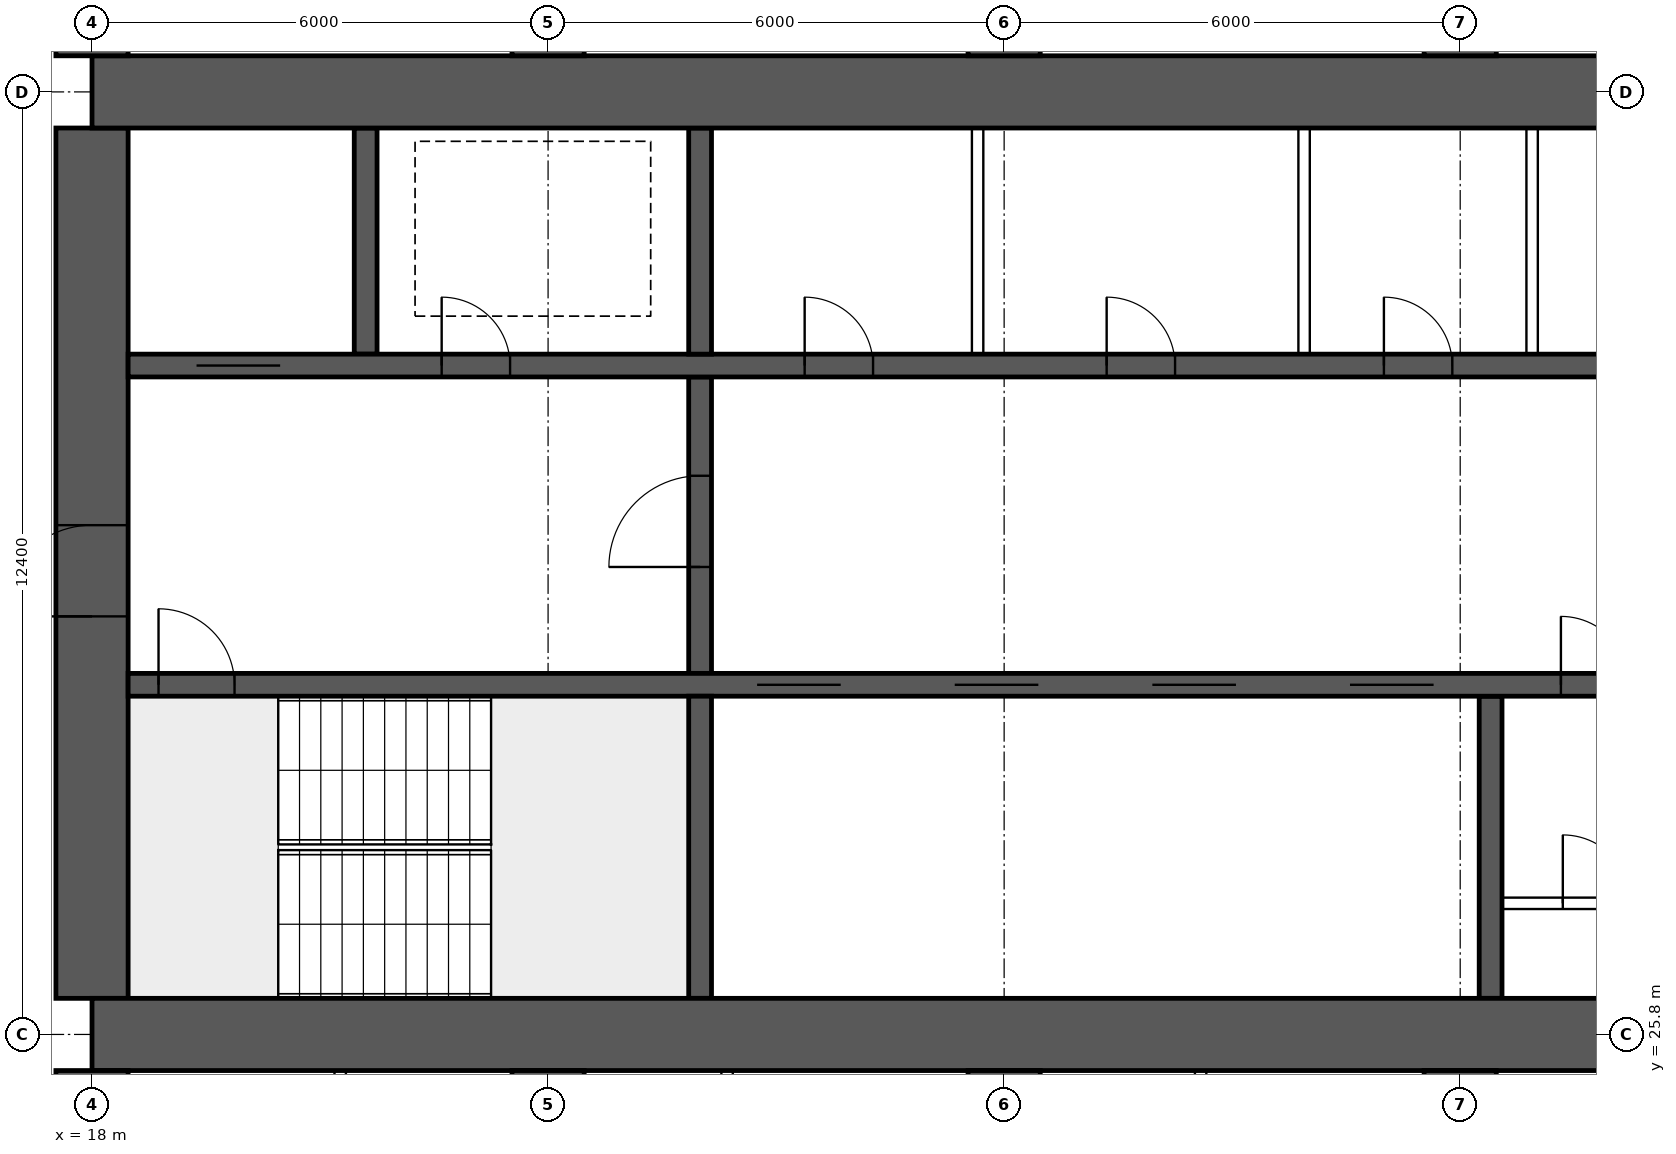
"""IFC4 building model, lengths in metres.
Left out: names, types, materials, properties, quantities, classifications, styles, units other than length and angle.
Written with IfcOpenShell. Run it as: python <this file> out.ifc"""

import sys

from ifc_helpers import new_model, si_unit, direction, frame, frame_2d, origin, place, context, subcontext, project, spatial, rectangle, extrude, element, fill, save


model = new_model("IFC4")
c1 = context("Model", 3, precision=1e-05, world=origin(), true_north=direction((0.0, 1.0)))
c2 = subcontext(c1, "Body", "Model", "MODEL_VIEW")
j1 = project(units=[si_unit("LENGTHUNIT", "METRE"), si_unit("PLANEANGLEUNIT", "RADIAN")], contexts=[c1])
p1 = place(None, origin())
s1 = spatial("IfcSite", under=j1, at=p1, CompositionType="ELEMENT")
p2 = place(p1, origin())
s2 = spatial("IfcBuilding", under=s1, at=p2, CompositionType="ELEMENT")
p3 = place(p2, frame((0.0, 0.0, 84.4)))
s3 = spatial("IfcBuildingStorey", under=s2, at=p3, CompositionType="ELEMENT", Elevation=84.4)
for number, where, z_axis, x_axis in (
    (1, (18.0, 25.8, 0.0), (0.0, 0.0, 1.0), (1.0, 0.0, 0.0)),
    (2, (18.0, 38.2, 0.0), (0.0, 0.0, 1.0), (1.0, 0.0, 0.0)),
):
    element("IfcWall", number, at=place(p3, frame(where, z_axis=z_axis, x_axis=x_axis)), inside=s3, PredefinedType="SHEAR", context=c2, shape_type="SweptSolid", body=[
        extrude(rectangle(XDim=48.0, YDim=0.95, at=frame_2d((24.0, 0.0))), origin(), (0.0, 0.0, 1.0), 3.75),
    ])
p4 = place(p3, frame((18.0, 26.275, 0.0), z_axis=(0.0, 0.0, 1.0), x_axis=(0.0, 1.0, 0.0)))
e3 = element("IfcWall", 3, at=p4, inside=s3, PredefinedType="SHEAR", context=c2, shape_type="SweptSolid", body=[
    extrude(rectangle(XDim=11.45, YDim=0.95, at=frame_2d((5.725, 0.0))), origin(), (0.0, 0.0, 1.0), 3.75),
])
p5 = place(p4, frame((5.025, 0.0, 0.0)))
e4 = element("IfcOpeningElement", 4, at=p5, cuts=e3, PredefinedType="OPENING", context=c2, shape_type="SweptSolid", body=[
    extrude(rectangle(XDim=1.2, YDim=2.1, at=frame_2d((0.6, 1.05))), frame((0.0, 0.485, 0.0), z_axis=(0.0, -1.0, 0.0), x_axis=(1.0, 0.0, 0.0)), (0.0, 0.0, 1.0), 0.97),
])
p6 = place(p3, frame((18.475, 30.4, 0.0), z_axis=(0.0, 0.0, 1.0), x_axis=(1.0, 0.0, 0.0)))
e5 = element("IfcWall", 5, at=p6, inside=s3, PredefinedType="SHEAR", context=c2, shape_type="SweptSolid", body=[
    extrude(rectangle(XDim=47.05, YDim=0.3, at=frame_2d((23.525, 0.0))), origin(), (0.0, 0.0, 1.0), 3.75),
])
p7 = place(p6, frame((0.4, 0.0, 0.0)))
e6 = element("IfcOpeningElement", 6, at=p7, cuts=e5, PredefinedType="OPENING", context=c2, shape_type="SweptSolid", body=[
    extrude(rectangle(XDim=1.0, YDim=2.1, at=frame_2d((0.5, 1.05))), frame((0.0, 0.16, 0.0), z_axis=(0.0, -1.0, 0.0), x_axis=(1.0, 0.0, 0.0)), (0.0, 0.0, 1.0), 0.32),
])
p8 = place(p6, frame((45.65, 0.0, 0.0)))
e7 = element("IfcOpeningElement", 7, at=p8, cuts=e5, PredefinedType="OPENING", context=c2, shape_type="SweptSolid", body=[
    extrude(rectangle(XDim=1.0, YDim=2.1, at=frame_2d((0.5, 1.05))), frame((0.0, 0.16, 0.0), z_axis=(0.0, -1.0, 0.0), x_axis=(1.0, 0.0, 0.0)), (0.0, 0.0, 1.0), 0.32),
])
p9 = place(p6, frame((8.275, 0.0, 0.0)))
e8 = element("IfcOpeningElement", 8, at=p9, cuts=e5, PredefinedType="OPENING", context=c2, shape_type="SweptSolid", body=[
    extrude(rectangle(XDim=1.1, YDim=2.1, at=frame_2d((0.55, 1.05))), frame((0.0, 0.16, 0.0), z_axis=(0.0, -1.0, 0.0), x_axis=(1.0, 0.0, 0.0)), (0.0, 0.0, 1.0), 0.32),
])
p10 = place(p6, frame((10.875, 0.0, 0.0)))
e9 = element("IfcOpeningElement", 9, at=p10, cuts=e5, PredefinedType="OPENING", context=c2, shape_type="SweptSolid", body=[
    extrude(rectangle(XDim=1.1, YDim=2.1, at=frame_2d((0.55, 1.05))), frame((0.0, 0.16, 0.0), z_axis=(0.0, -1.0, 0.0), x_axis=(1.0, 0.0, 0.0)), (0.0, 0.0, 1.0), 0.32),
])
p11 = place(p6, frame((13.475, 0.0, 0.0)))
e10 = element("IfcOpeningElement", 10, at=p11, cuts=e5, PredefinedType="OPENING", context=c2, shape_type="SweptSolid", body=[
    extrude(rectangle(XDim=1.1, YDim=2.1, at=frame_2d((0.55, 1.05))), frame((0.0, 0.16, 0.0), z_axis=(0.0, -1.0, 0.0), x_axis=(1.0, 0.0, 0.0)), (0.0, 0.0, 1.0), 0.32),
])
p12 = place(p6, frame((16.075, 0.0, 0.0)))
e11 = element("IfcOpeningElement", 11, at=p12, cuts=e5, PredefinedType="OPENING", context=c2, shape_type="SweptSolid", body=[
    extrude(rectangle(XDim=1.1, YDim=2.1, at=frame_2d((0.55, 1.05))), frame((0.0, 0.16, 0.0), z_axis=(0.0, -1.0, 0.0), x_axis=(1.0, 0.0, 0.0)), (0.0, 0.0, 1.0), 0.32),
])
p13 = place(p6, frame((18.85, 0.0, 0.0)))
e12 = element("IfcOpeningElement", 12, at=p13, cuts=e5, PredefinedType="OPENING", context=c2, shape_type="SweptSolid", body=[
    extrude(rectangle(XDim=0.9, YDim=2.1, at=frame_2d((0.45, 1.05))), frame((0.0, 0.16, 0.0), z_axis=(0.0, -1.0, 0.0), x_axis=(1.0, 0.0, 0.0)), (0.0, 0.0, 1.0), 0.32),
])
p14 = place(p6, frame((30.142, 0.0, 0.0)))
e13 = element("IfcOpeningElement", 13, at=p14, cuts=e5, PredefinedType="OPENING", context=c2, shape_type="SweptSolid", body=[
    extrude(rectangle(XDim=1.1, YDim=2.1, at=frame_2d((0.55, 1.05))), frame((0.0, 0.16, 0.0), z_axis=(0.0, -1.0, 0.0), x_axis=(1.0, 0.0, 0.0)), (0.0, 0.0, 1.0), 0.32),
])
p15 = place(p6, frame((33.675, 0.0, 0.0)))
e14 = element("IfcOpeningElement", 14, at=p15, cuts=e5, PredefinedType="OPENING", context=c2, shape_type="SweptSolid", body=[
    extrude(rectangle(XDim=1.1, YDim=2.1, at=frame_2d((0.55, 1.05))), frame((0.0, 0.16, 0.0), z_axis=(0.0, -1.0, 0.0), x_axis=(1.0, 0.0, 0.0)), (0.0, 0.0, 1.0), 0.32),
])
p16 = place(p6, frame((37.208, 0.0, 0.0)))
e15 = element("IfcOpeningElement", 15, at=p16, cuts=e5, PredefinedType="OPENING", context=c2, shape_type="SweptSolid", body=[
    extrude(rectangle(XDim=1.1, YDim=2.1, at=frame_2d((0.55, 1.05))), frame((0.0, 0.16, 0.0), z_axis=(0.0, -1.0, 0.0), x_axis=(1.0, 0.0, 0.0)), (0.0, 0.0, 1.0), 0.32),
])
p17 = place(p3, frame((18.475, 34.6, 0.0), z_axis=(0.0, 0.0, 1.0), x_axis=(1.0, 0.0, 0.0)))
e16 = element("IfcWall", 16, at=p17, inside=s3, PredefinedType="SHEAR", context=c2, shape_type="SweptSolid", body=[
    extrude(rectangle(XDim=47.05, YDim=0.3, at=frame_2d((23.525, 0.0))), origin(), (0.0, 0.0, 1.0), 3.75),
])
p18 = place(p17, frame((0.9, 0.0, 0.0)))
e17 = element("IfcOpeningElement", 17, at=p18, cuts=e16, PredefinedType="OPENING", context=c2, shape_type="SweptSolid", body=[
    extrude(rectangle(XDim=1.1, YDim=2.1, at=frame_2d((0.55, 1.05))), frame((0.0, 0.16, 0.0), z_axis=(0.0, -1.0, 0.0), x_axis=(1.0, 0.0, 0.0)), (0.0, 0.0, 1.0), 0.32),
])
p19 = place(p17, frame((45.05, 0.0, 0.0)))
e18 = element("IfcOpeningElement", 18, at=p19, cuts=e16, PredefinedType="OPENING", context=c2, shape_type="SweptSolid", body=[
    extrude(rectangle(XDim=1.1, YDim=2.1, at=frame_2d((0.55, 1.05))), frame((0.0, 0.16, 0.0), z_axis=(0.0, -1.0, 0.0), x_axis=(1.0, 0.0, 0.0)), (0.0, 0.0, 1.0), 0.32),
])
p20 = place(p17, frame((4.125, 0.0, 0.0)))
e19 = element("IfcOpeningElement", 19, at=p20, cuts=e16, PredefinedType="OPENING", context=c2, shape_type="SweptSolid", body=[
    extrude(rectangle(XDim=0.9, YDim=2.1, at=frame_2d((0.45, 1.05))), frame((0.0, 0.16, 0.0), z_axis=(0.0, -1.0, 0.0), x_axis=(1.0, 0.0, 0.0)), (0.0, 0.0, 1.0), 0.32),
])
p21 = place(p17, frame((42.025, 0.0, 0.0)))
e20 = element("IfcOpeningElement", 20, at=p21, cuts=e16, PredefinedType="OPENING", context=c2, shape_type="SweptSolid", body=[
    extrude(rectangle(XDim=0.9, YDim=2.1, at=frame_2d((0.45, 1.05))), frame((0.0, 0.16, 0.0), z_axis=(0.0, -1.0, 0.0), x_axis=(1.0, 0.0, 0.0)), (0.0, 0.0, 1.0), 0.32),
])
p22 = place(p17, frame((8.9, 0.0, 0.0)))
e21 = element("IfcOpeningElement", 21, at=p22, cuts=e16, PredefinedType="OPENING", context=c2, shape_type="SweptSolid", body=[
    extrude(rectangle(XDim=0.9, YDim=2.1, at=frame_2d((0.45, 1.05))), frame((0.0, 0.16, 0.0), z_axis=(0.0, -1.0, 0.0), x_axis=(1.0, 0.0, 0.0)), (0.0, 0.0, 1.0), 0.32),
])
p23 = place(p17, frame((12.874, 0.0, 0.0)))
e22 = element("IfcOpeningElement", 22, at=p23, cuts=e16, PredefinedType="OPENING", context=c2, shape_type="SweptSolid", body=[
    extrude(rectangle(XDim=0.9, YDim=2.1, at=frame_2d((0.45, 1.05))), frame((0.0, 0.16, 0.0), z_axis=(0.0, -1.0, 0.0), x_axis=(1.0, 0.0, 0.0)), (0.0, 0.0, 1.0), 0.32),
])
p24 = place(p17, frame((16.521, 0.0, 0.0)))
e23 = element("IfcOpeningElement", 23, at=p24, cuts=e16, PredefinedType="OPENING", context=c2, shape_type="SweptSolid", body=[
    extrude(rectangle(XDim=0.9, YDim=2.1, at=frame_2d((0.45, 1.05))), frame((0.0, 0.16, 0.0), z_axis=(0.0, -1.0, 0.0), x_axis=(1.0, 0.0, 0.0)), (0.0, 0.0, 1.0), 0.32),
])
p25 = place(p17, frame((20.28, 0.0, 0.0)))
e24 = element("IfcOpeningElement", 24, at=p25, cuts=e16, PredefinedType="OPENING", context=c2, shape_type="SweptSolid", body=[
    extrude(rectangle(XDim=0.9, YDim=2.1, at=frame_2d((0.45, 1.05))), frame((0.0, 0.16, 0.0), z_axis=(0.0, -1.0, 0.0), x_axis=(1.0, 0.0, 0.0)), (0.0, 0.0, 1.0), 0.32),
])
p26 = place(p17, frame((24.686, 0.0, 0.0)))
e25 = element("IfcOpeningElement", 25, at=p26, cuts=e16, PredefinedType="OPENING", context=c2, shape_type="SweptSolid", body=[
    extrude(rectangle(XDim=0.9, YDim=2.1, at=frame_2d((0.45, 1.05))), frame((0.0, 0.16, 0.0), z_axis=(0.0, -1.0, 0.0), x_axis=(1.0, 0.0, 0.0)), (0.0, 0.0, 1.0), 0.32),
])
p27 = place(p17, frame((27.483, 0.0, 0.0)))
e26 = element("IfcOpeningElement", 26, at=p27, cuts=e16, PredefinedType="OPENING", context=c2, shape_type="SweptSolid", body=[
    extrude(rectangle(XDim=0.9, YDim=2.1, at=frame_2d((0.45, 1.05))), frame((0.0, 0.16, 0.0), z_axis=(0.0, -1.0, 0.0), x_axis=(1.0, 0.0, 0.0)), (0.0, 0.0, 1.0), 0.32),
])
p28 = place(p17, frame((33.604, 0.0, 0.0)))
e27 = element("IfcOpeningElement", 27, at=p28, cuts=e16, PredefinedType="OPENING", context=c2, shape_type="SweptSolid", body=[
    extrude(rectangle(XDim=0.9, YDim=2.1, at=frame_2d((0.45, 1.05))), frame((0.0, 0.16, 0.0), z_axis=(0.0, -1.0, 0.0), x_axis=(1.0, 0.0, 0.0)), (0.0, 0.0, 1.0), 0.32),
])
p29 = place(p3, frame((26.0, 26.275, 0.0), z_axis=(0.0, 0.0, 1.0), x_axis=(0.0, 1.0, 0.0)))
e28 = element("IfcWall", 28, at=p29, inside=s3, PredefinedType="SHEAR", context=c2, shape_type="SweptSolid", body=[
    extrude(rectangle(XDim=3.975, YDim=0.3, at=frame_2d((1.988, 0.0))), origin(), (0.0, 0.0, 1.0), 3.75),
])
p30 = place(p3, frame((26.0, 30.55, 0.0), z_axis=(0.0, 0.0, 1.0), x_axis=(0.0, 1.0, 0.0)))
e29 = element("IfcWall", 29, at=p30, inside=s3, PredefinedType="SHEAR", context=c2, shape_type="SweptSolid", body=[
    extrude(rectangle(XDim=3.9, YDim=0.3, at=frame_2d((1.95, 0.0))), origin(), (0.0, 0.0, 1.0), 3.75),
])
p31 = place(p30, frame((1.4, 0.0, 0.0)))
e30 = element("IfcOpeningElement", 30, at=p31, cuts=e29, PredefinedType="OPENING", context=c2, shape_type="SweptSolid", body=[
    extrude(rectangle(XDim=1.2, YDim=2.1, at=frame_2d((0.6, 1.05))), frame((0.0, 0.16, 0.0), z_axis=(0.0, -1.0, 0.0), x_axis=(1.0, 0.0, 0.0)), (0.0, 0.0, 1.0), 0.32),
])
for number, where, z_axis, x_axis in (
    (31, (21.6, 34.75, 0.0), (0.0, 0.0, 1.0), (0.0, 1.0, 0.0)),
    (32, (26.0, 34.75, 0.0), (0.0, 0.0, 1.0), (0.0, 1.0, 0.0)),
):
    element("IfcWall", number, at=place(p3, frame(where, z_axis=z_axis, x_axis=x_axis)), inside=s3, PredefinedType="SHEAR", context=c2, shape_type="SweptSolid", body=[
        extrude(rectangle(XDim=2.975, YDim=0.3, at=frame_2d((1.488, 0.0))), origin(), (0.0, 0.0, 1.0), 3.75),
    ])
p32 = place(p3, frame((36.4, 26.275, 0.0), z_axis=(0.0, 0.0, 1.0), x_axis=(0.0, 1.0, 0.0)))
e33 = element("IfcWall", 33, at=p32, inside=s3, PredefinedType="SHEAR", context=c2, shape_type="SweptSolid", body=[
    extrude(rectangle(XDim=3.975, YDim=0.3, at=frame_2d((1.988, 0.0))), origin(), (0.0, 0.0, 1.0), 3.75),
])
for number, where, z_axis, x_axis in (
    (34, (18.0, 16.0, 0.0), (0.0, 0.0, 1.0), (0.0, 1.0, 0.0)),
    (35, (18.0, 38.675, 0.0), (0.0, 0.0, 1.0), (0.0, 1.0, 0.0)),
    (36, (24.0, 16.0, 0.0), (0.0, 0.0, 1.0), (0.0, 1.0, 0.0)),
    (37, (24.0, 38.675, 0.0), (0.0, 0.0, 1.0), (0.0, 1.0, 0.0)),
    (38, (30.0, 16.0, 0.0), (0.0, 0.0, 1.0), (0.0, 1.0, 0.0)),
    (39, (30.0, 38.675, 0.0), (0.0, 0.0, 1.0), (0.0, 1.0, 0.0)),
    (40, (36.0, 16.0, 0.0), (0.0, 0.0, 1.0), (0.0, 1.0, 0.0)),
    (41, (36.0, 38.675, 0.0), (0.0, 0.0, 1.0), (0.0, 1.0, 0.0)),
):
    element("IfcWall", number, at=place(p3, frame(where, z_axis=z_axis, x_axis=x_axis)), inside=s3, PredefinedType="SHEAR", context=c2, shape_type="SweptSolid", body=[
        extrude(rectangle(XDim=9.325, YDim=0.95, at=frame_2d((4.663, 0.0))), origin(), (0.0, 0.0, 1.0), 3.75),
    ])
for number, where, z_axis, x_axis in (
    (42, (29.651, 34.75, 0.0), (0.0, 0.0, 1.0), (0.0, 1.0, 0.0)),
    (43, (33.946, 34.75, 0.0), (0.0, 0.0, 1.0), (0.0, 1.0, 0.0)),
    (44, (36.946, 34.75, 0.0), (0.0, 0.0, 1.0), (0.0, 1.0, 0.0)),
):
    element("IfcWall", number, at=place(p3, frame(where, z_axis=z_axis, x_axis=x_axis)), inside=s3, PredefinedType="SOLIDWALL", context=c2, shape_type="SweptSolid", body=[
        extrude(rectangle(XDim=2.975, YDim=0.15, at=frame_2d((1.488, 0.0))), origin(), (0.0, 0.0, 1.0), 3.5),
    ])
p33 = place(p3, frame((36.55, 27.525, 0.0), z_axis=(0.0, 0.0, 1.0), x_axis=(1.0, 0.0, 0.0)))
e45 = element("IfcWall", 45, at=p33, inside=s3, PredefinedType="SOLIDWALL", context=c2, shape_type="SweptSolid", body=[
    extrude(rectangle(XDim=2.5, YDim=0.15, at=frame_2d((1.25, 0.0))), origin(), (0.0, 0.0, 1.0), 3.5),
])
p34 = place(p33, frame((0.8, 0.0, 0.0)))
e46 = element("IfcOpeningElement", 46, at=p34, cuts=e45, PredefinedType="OPENING", context=c2, shape_type="SweptSolid", body=[
    extrude(rectangle(XDim=0.9, YDim=2.1, at=frame_2d((0.45, 1.05))), frame((0.0, 0.085, 0.0), z_axis=(0.0, -1.0, 0.0), x_axis=(1.0, 0.0, 0.0)), (0.0, 0.0, 1.0), 0.17),
])
for number, where, z_axis, x_axis in (
    (47, (21.265, 16.1, 0.0), (0.0, 0.0, 1.0), (0.0, 1.0, 0.0)),
    (48, (26.355, 16.1, 0.0), (0.0, 0.0, 1.0), (0.0, 1.0, 0.0)),
    (49, (32.585, 16.1, 0.0), (0.0, 0.0, 1.0), (0.0, 1.0, 0.0)),
):
    element("IfcWall", number, at=place(p3, frame(where, z_axis=z_axis, x_axis=x_axis)), inside=s3, PredefinedType="PARTITIONING", context=c2, shape_type="SweptSolid", body=[
        extrude(rectangle(XDim=9.225, YDim=0.15, at=frame_2d((4.612, 0.0))), origin(), (0.0, 0.0, 1.0), 3.5),
    ])
p35 = place(p5, origin())
e50 = element("IfcDoor", 50, at=p35, inside=s3, OperationType="SINGLE_SWING_LEFT", PredefinedType="DOOR", context=c2, shape_type="SweptSolid", body=[
    extrude(rectangle(XDim=1.2, YDim=2.1, at=frame_2d((0.6, 1.05))), frame((0.0, 0.025, 0.0), z_axis=(0.0, -1.0, 0.0), x_axis=(1.0, 0.0, 0.0)), (0.0, 0.0, 1.0), 0.05),
])
fill(e4, e50)
p36 = place(p7, origin())
e51 = element("IfcDoor", 51, at=p36, inside=s3, OperationType="SINGLE_SWING_LEFT", PredefinedType="DOOR", context=c2, shape_type="SweptSolid", body=[
    extrude(rectangle(XDim=1.0, YDim=2.1, at=frame_2d((0.5, 1.05))), frame((0.0, 0.025, 0.0), z_axis=(0.0, -1.0, 0.0), x_axis=(1.0, 0.0, 0.0)), (0.0, 0.0, 1.0), 0.05),
])
fill(e6, e51)
p37 = place(p18, origin())
e52 = element("IfcDoor", 52, at=p37, inside=s3, OperationType="DOUBLE_DOOR_SLIDING", PredefinedType="DOOR", context=c2, shape_type="SweptSolid", body=[
    extrude(rectangle(XDim=1.1, YDim=2.1, at=frame_2d((0.55, 1.05))), frame((0.0, 0.025, 0.0), z_axis=(0.0, -1.0, 0.0), x_axis=(1.0, 0.0, 0.0)), (0.0, 0.0, 1.0), 0.05),
])
fill(e17, e52)
p38 = place(p20, origin())
e53 = element("IfcDoor", 53, at=p38, inside=s3, OperationType="SINGLE_SWING_LEFT", PredefinedType="DOOR", context=c2, shape_type="SweptSolid", body=[
    extrude(rectangle(XDim=0.9, YDim=2.1, at=frame_2d((0.45, 1.05))), frame((0.0, 0.025, 0.0), z_axis=(0.0, -1.0, 0.0), x_axis=(1.0, 0.0, 0.0)), (0.0, 0.0, 1.0), 0.05),
])
fill(e19, e53)
p39 = place(p31, origin())
e54 = element("IfcDoor", 54, at=p39, inside=s3, OperationType="SINGLE_SWING_LEFT", PredefinedType="DOOR", context=c2, shape_type="SweptSolid", body=[
    extrude(rectangle(XDim=1.2, YDim=2.1, at=frame_2d((0.6, 1.05))), frame((0.0, 0.025, 0.0), z_axis=(0.0, -1.0, 0.0), x_axis=(1.0, 0.0, 0.0)), (0.0, 0.0, 1.0), 0.05),
])
fill(e30, e54)
p40 = place(p22, origin())
e55 = element("IfcDoor", 55, at=p40, inside=s3, OperationType="SINGLE_SWING_LEFT", PredefinedType="DOOR", context=c2, shape_type="SweptSolid", body=[
    extrude(rectangle(XDim=0.9, YDim=2.1, at=frame_2d((0.45, 1.05))), frame((0.0, 0.025, 0.0), z_axis=(0.0, -1.0, 0.0), x_axis=(1.0, 0.0, 0.0)), (0.0, 0.0, 1.0), 0.05),
])
fill(e21, e55)
p41 = place(p23, origin())
e56 = element("IfcDoor", 56, at=p41, inside=s3, OperationType="SINGLE_SWING_LEFT", PredefinedType="DOOR", context=c2, shape_type="SweptSolid", body=[
    extrude(rectangle(XDim=0.9, YDim=2.1, at=frame_2d((0.45, 1.05))), frame((0.0, 0.025, 0.0), z_axis=(0.0, -1.0, 0.0), x_axis=(1.0, 0.0, 0.0)), (0.0, 0.0, 1.0), 0.05),
])
fill(e22, e56)
p42 = place(p24, origin())
e57 = element("IfcDoor", 57, at=p42, inside=s3, OperationType="SINGLE_SWING_LEFT", PredefinedType="DOOR", context=c2, shape_type="SweptSolid", body=[
    extrude(rectangle(XDim=0.9, YDim=2.1, at=frame_2d((0.45, 1.05))), frame((0.0, 0.025, 0.0), z_axis=(0.0, -1.0, 0.0), x_axis=(1.0, 0.0, 0.0)), (0.0, 0.0, 1.0), 0.05),
])
fill(e23, e57)
p43 = place(p9, origin())
e58 = element("IfcDoor", 58, at=p43, inside=s3, OperationType="DOUBLE_DOOR_SLIDING", PredefinedType="DOOR", context=c2, shape_type="SweptSolid", body=[
    extrude(rectangle(XDim=1.1, YDim=2.1, at=frame_2d((0.55, 1.05))), frame((0.0, 0.025, 0.0), z_axis=(0.0, -1.0, 0.0), x_axis=(1.0, 0.0, 0.0)), (0.0, 0.0, 1.0), 0.05),
])
fill(e8, e58)
p44 = place(p10, origin())
e59 = element("IfcDoor", 59, at=p44, inside=s3, OperationType="DOUBLE_DOOR_SLIDING", PredefinedType="DOOR", context=c2, shape_type="SweptSolid", body=[
    extrude(rectangle(XDim=1.1, YDim=2.1, at=frame_2d((0.55, 1.05))), frame((0.0, 0.025, 0.0), z_axis=(0.0, -1.0, 0.0), x_axis=(1.0, 0.0, 0.0)), (0.0, 0.0, 1.0), 0.05),
])
fill(e9, e59)
p45 = place(p11, origin())
e60 = element("IfcDoor", 60, at=p45, inside=s3, OperationType="DOUBLE_DOOR_SLIDING", PredefinedType="DOOR", context=c2, shape_type="SweptSolid", body=[
    extrude(rectangle(XDim=1.1, YDim=2.1, at=frame_2d((0.55, 1.05))), frame((0.0, 0.025, 0.0), z_axis=(0.0, -1.0, 0.0), x_axis=(1.0, 0.0, 0.0)), (0.0, 0.0, 1.0), 0.05),
])
fill(e10, e60)
p46 = place(p12, origin())
e61 = element("IfcDoor", 61, at=p46, inside=s3, OperationType="DOUBLE_DOOR_SLIDING", PredefinedType="DOOR", context=c2, shape_type="SweptSolid", body=[
    extrude(rectangle(XDim=1.1, YDim=2.1, at=frame_2d((0.55, 1.05))), frame((0.0, 0.025, 0.0), z_axis=(0.0, -1.0, 0.0), x_axis=(1.0, 0.0, 0.0)), (0.0, 0.0, 1.0), 0.05),
])
fill(e11, e61)
p47 = place(p34, origin())
e62 = element("IfcDoor", 62, at=p47, inside=s3, OperationType="SINGLE_SWING_LEFT", PredefinedType="DOOR", context=c2, shape_type="SweptSolid", body=[
    extrude(rectangle(XDim=0.9, YDim=2.1, at=frame_2d((0.45, 1.05))), frame((0.0, 0.025, 0.0), z_axis=(0.0, -1.0, 0.0), x_axis=(1.0, 0.0, 0.0)), (0.0, 0.0, 1.0), 0.05),
])
fill(e46, e62)
p48 = place(p13, origin())
e63 = element("IfcDoor", 63, at=p48, inside=s3, OperationType="SINGLE_SWING_LEFT", PredefinedType="DOOR", context=c2, shape_type="SweptSolid", body=[
    extrude(rectangle(XDim=0.9, YDim=2.1, at=frame_2d((0.45, 1.05))), frame((0.0, 0.025, 0.0), z_axis=(0.0, -1.0, 0.0), x_axis=(1.0, 0.0, 0.0)), (0.0, 0.0, 1.0), 0.05),
])
fill(e12, e63)
save(model, sys.argv[1])
